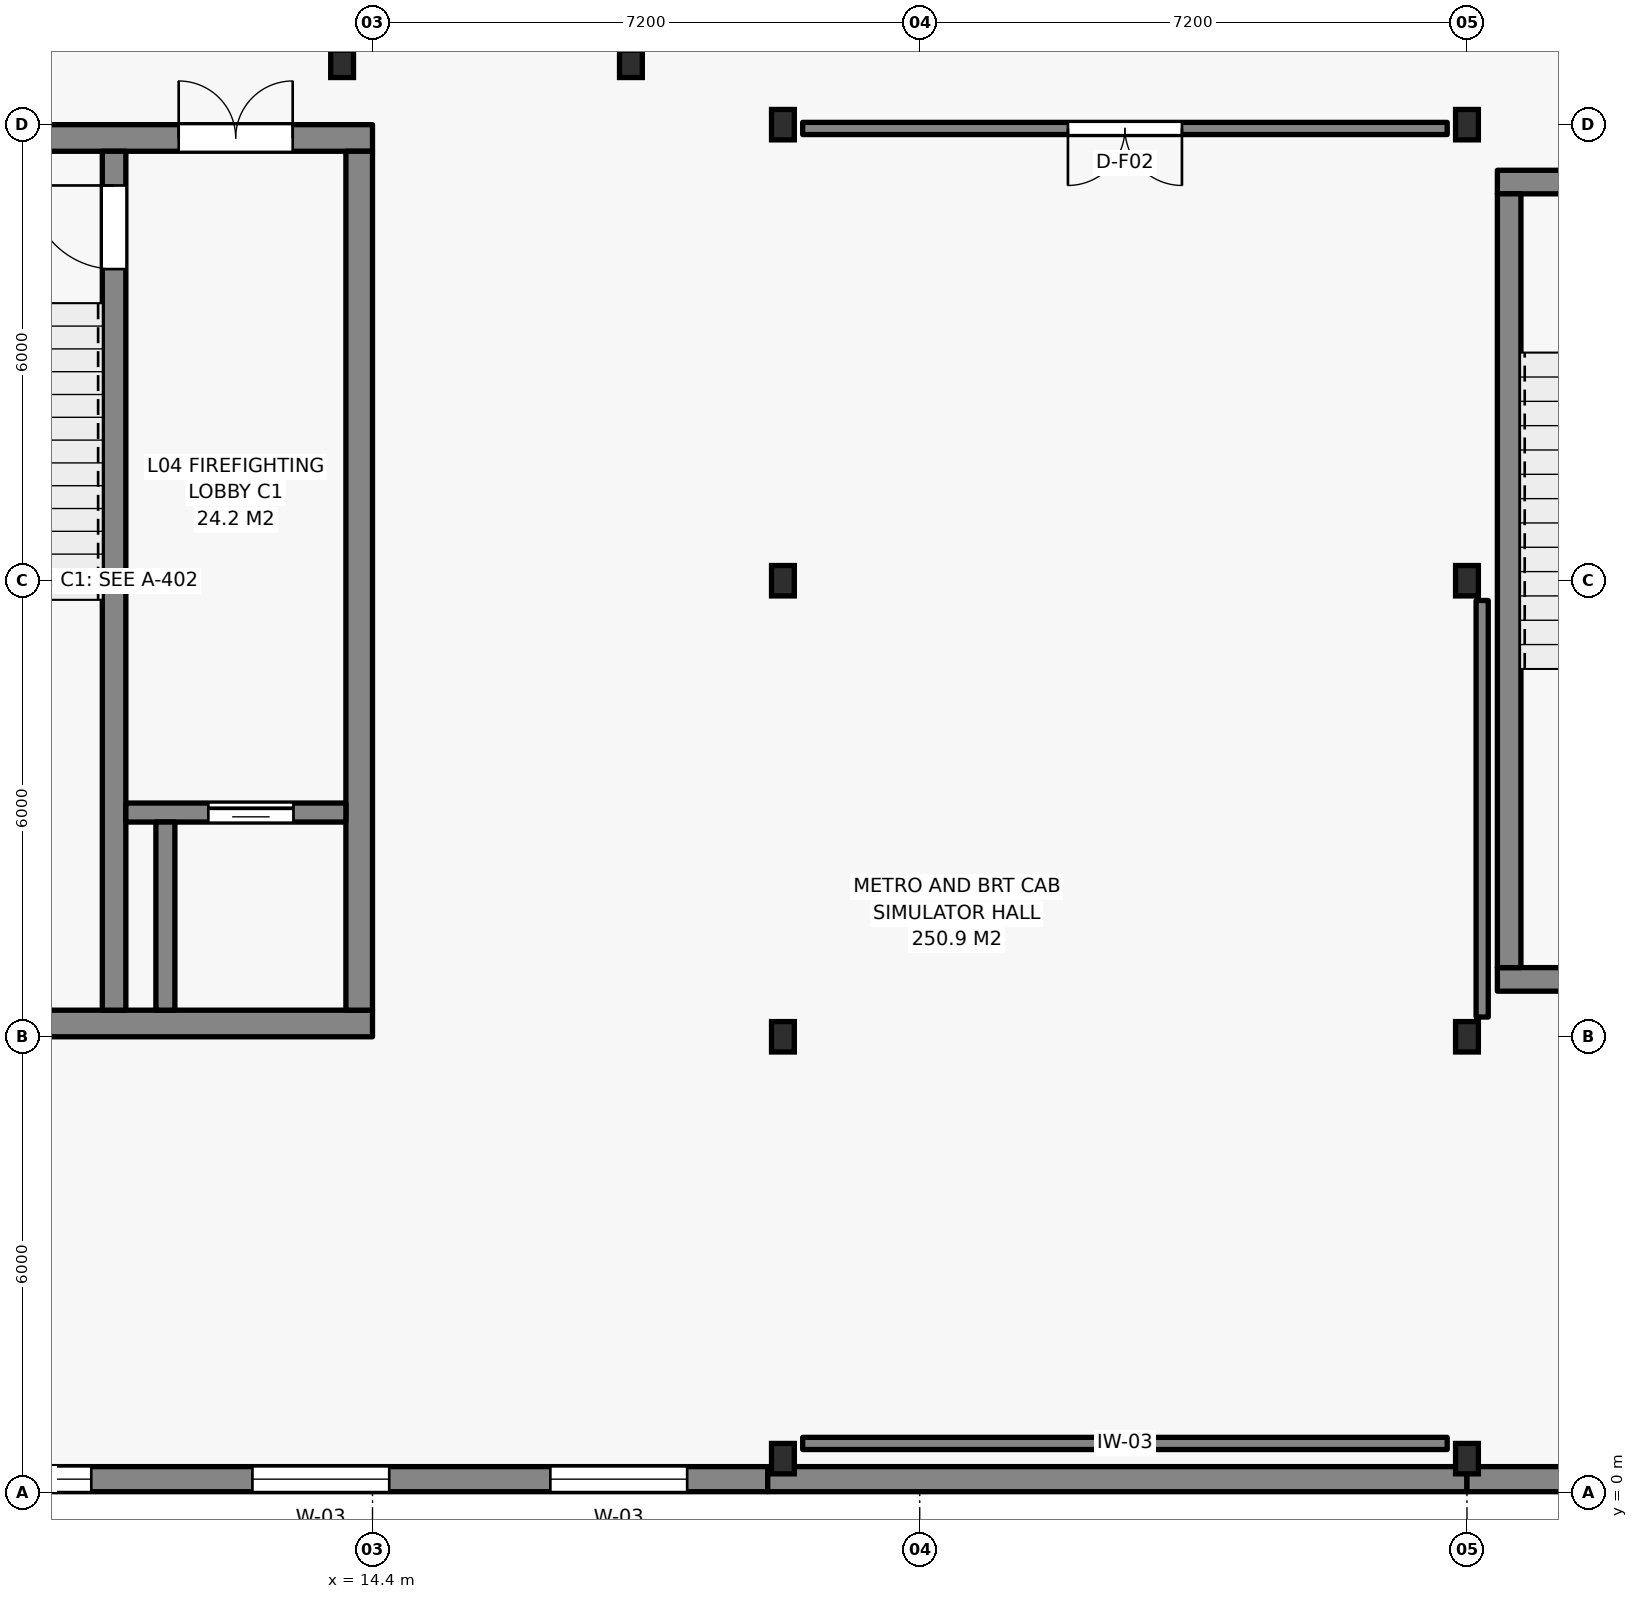
"""IFC4 building model, lengths in metres.
Left out: names, types, materials, properties, quantities, classifications, styles, units other than length and angle.
Written with IfcOpenShell. Run it as: python <this file> out.ifc"""

import sys

from ifc_helpers import new_model, si_unit, direction, frame, frame_2d, origin, origin_2d, place, context, subcontext, project, spatial, rectangle, i_section, extrude, element, fill, save


model = new_model("IFC4")
c1 = context("Model", 3, precision=1e-05, world=origin(), true_north=direction((0.0, 1.0)))
c2 = subcontext(c1, "Body", "Model", "MODEL_VIEW")
j1 = project(units=[si_unit("LENGTHUNIT", "METRE"), si_unit("PLANEANGLEUNIT", "RADIAN")], contexts=[c1])
p1 = place(None, origin())
s1 = spatial("IfcSite", under=j1, at=p1, CompositionType="ELEMENT")
p2 = place(p1, origin())
s2 = spatial("IfcBuilding", under=s1, at=p2, CompositionType="ELEMENT")
p3 = place(p2, frame((0.0, 0.0, 14.7)))
s3 = spatial("IfcBuildingStorey", under=s2, at=p3, CompositionType="ELEMENT", Elevation=14.7)
p4 = place(p3, frame((7.2, 6.175, 0.0), z_axis=(0.0, 0.0, 1.0), x_axis=(1.0, 0.0, 0.0)))
e1 = element("IfcWall", 1, at=p4, inside=s3, PredefinedType="SHEAR", context=c2, shape_type="SweptSolid", body=[
    extrude(rectangle(XDim=7.2, YDim=0.35, at=frame_2d((3.6, 0.0))), origin(), (0.0, 0.0, 1.0), 3.8),
])
p5 = place(p3, frame((7.2, 17.825, 0.0), z_axis=(0.0, 0.0, 1.0), x_axis=(1.0, 0.0, 0.0)))
e2 = element("IfcWall", 2, at=p5, inside=s3, PredefinedType="SHEAR", context=c2, shape_type="SweptSolid", body=[
    extrude(rectangle(XDim=7.2, YDim=0.35, at=frame_2d((3.6, 0.0))), origin(), (0.0, 0.0, 1.0), 3.8),
])
p6 = place(p5, frame((4.65, 0.0, 0.0)))
e3 = element("IfcOpeningElement", 3, at=p6, cuts=e2, PredefinedType="OPENING", context=c2, shape_type="SweptSolid", body=[
    extrude(rectangle(XDim=1.5, YDim=2.15, at=frame_2d((0.75, 1.075))), frame((0.0, 0.185, 0.0), z_axis=(0.0, -1.0, 0.0), x_axis=(1.0, 0.0, 0.0)), (0.0, 0.0, 1.0), 0.37),
])
p7 = place(p3, frame((14.225, 6.35, 0.0), z_axis=(0.0, 0.0, 1.0), x_axis=(0.0, 1.0, 0.0)))
e4 = element("IfcWall", 4, at=p7, inside=s3, PredefinedType="SHEAR", context=c2, shape_type="SweptSolid", body=[
    extrude(rectangle(XDim=11.3, YDim=0.35, at=frame_2d((5.65, 0.0))), origin(), (0.0, 0.0, 1.0), 3.8),
])
p8 = place(p3, frame((11.0, 6.35, 0.0), z_axis=(0.0, 0.0, 1.0), x_axis=(0.0, 1.0, 0.0)))
e5 = element("IfcWall", 5, at=p8, inside=s3, PredefinedType="SHEAR", context=c2, shape_type="SweptSolid", body=[
    extrude(rectangle(XDim=11.3, YDim=0.31, at=frame_2d((5.65, 0.0))), origin(), (0.0, 0.0, 1.0), 3.8),
])
p9 = place(p8, frame((9.75, 0.0, 0.0)))
e6 = element("IfcOpeningElement", 6, at=p9, cuts=e5, PredefinedType="OPENING", context=c2, shape_type="SweptSolid", body=[
    extrude(rectangle(XDim=1.1, YDim=2.15, at=frame_2d((0.55, 1.075))), frame((0.0, 0.165, 0.0), z_axis=(0.0, -1.0, 0.0), x_axis=(1.0, 0.0, 0.0)), (0.0, 0.0, 1.0), 0.33),
])
p10 = place(p3, frame((29.2, 6.755, 0.0), z_axis=(0.0, 0.0, 1.0), x_axis=(1.0, 0.0, 0.0)))
e7 = element("IfcWall", 7, at=p10, inside=s3, PredefinedType="SHEAR", context=c2, shape_type="SweptSolid", body=[
    extrude(rectangle(XDim=4.8, YDim=0.31, at=frame_2d((2.4, 0.0))), origin(), (0.0, 0.0, 1.0), 3.8),
])
p11 = place(p3, frame((29.2, 17.245, 0.0), z_axis=(0.0, 0.0, 1.0), x_axis=(1.0, 0.0, 0.0)))
e8 = element("IfcWall", 8, at=p11, inside=s3, PredefinedType="SHEAR", context=c2, shape_type="SweptSolid", body=[
    extrude(rectangle(XDim=4.8, YDim=0.31, at=frame_2d((2.4, 0.0))), origin(), (0.0, 0.0, 1.0), 3.8),
])
p12 = place(p11, frame((1.5, 0.0, 0.0)))
e9 = element("IfcOpeningElement", 9, at=p12, cuts=e8, PredefinedType="OPENING", context=c2, shape_type="SweptSolid", body=[
    extrude(rectangle(XDim=1.8, YDim=2.15, at=frame_2d((0.9, 1.075))), frame((0.0, 0.165, 0.0), z_axis=(0.0, -1.0, 0.0), x_axis=(1.0, 0.0, 0.0)), (0.0, 0.0, 1.0), 0.33),
])
p13 = place(p3, frame((29.355, 6.91, 0.0), z_axis=(0.0, 0.0, 1.0), x_axis=(0.0, 1.0, 0.0)))
e10 = element("IfcWall", 10, at=p13, inside=s3, PredefinedType="SHEAR", context=c2, shape_type="SweptSolid", body=[
    extrude(rectangle(XDim=10.18, YDim=0.31, at=frame_2d((5.09, 0.0))), origin(), (0.0, 0.0, 1.0), 3.8),
])
for number, where, z_axis, x_axis in (
    (11, (19.8, 0.45, 0.0), (0.0, 0.0, 1.0), (1.0, 0.0, 0.0)),
    (12, (19.8, 6.0, 0.0), (0.0, 0.0, 1.0), (1.0, 0.0, 0.0)),
    (13, (19.8, 12.0, 0.0), (0.0, 0.0, 1.0), (1.0, 0.0, 0.0)),
    (14, (19.8, 18.0, 0.0), (0.0, 0.0, 1.0), (1.0, 0.0, 0.0)),
    (15, (28.8, 0.45, 0.0), (0.0, 0.0, 1.0), (1.0, 0.0, 0.0)),
    (16, (28.8, 6.0, 0.0), (0.0, 0.0, 1.0), (1.0, 0.0, 0.0)),
    (17, (28.8, 12.0, 0.0), (0.0, 0.0, 1.0), (1.0, 0.0, 0.0)),
    (18, (28.8, 18.0, 0.0), (0.0, 0.0, 1.0), (1.0, 0.0, 0.0)),
):
    element("IfcColumn", number, at=place(p3, frame(where, z_axis=z_axis, x_axis=x_axis)), inside=s3, PredefinedType="COLUMN", context=c2, shape_type="SweptSolid", body=[
        extrude(i_section(OverallWidth=0.3, OverallDepth=0.4, WebThickness=0.013, FlangeThickness=0.024, FilletRadius=0.027, at=origin_2d()), origin(), (0.0, 0.0, 1.0), 4.05),
    ])
for number, where, z_axis, x_axis in (
    (19, (14.0, 18.8, 0.0), (0.0, 0.0, 1.0), (1.0, 0.0, 0.0)),
    (20, (17.8, 18.8, 0.0), (0.0, 0.0, 1.0), (1.0, 0.0, 0.0)),
):
    element("IfcColumn", number, at=place(p3, frame(where, z_axis=z_axis, x_axis=x_axis)), inside=s3, PredefinedType="COLUMN", context=c2, shape_type="SweptSolid", body=[
        extrude(i_section(OverallWidth=0.3, OverallDepth=0.36, WebThickness=0.012, FlangeThickness=0.022, FilletRadius=0.027, at=origin_2d()), origin(), (0.0, 0.0, 1.0), 4.05),
    ])
p14 = place(p3, frame((0.0, 0.18, 0.0), z_axis=(0.0, 0.0, 1.0), x_axis=(1.0, 0.0, 0.0)))
e21 = element("IfcWall", 21, at=p14, inside=s3, PredefinedType="SOLIDWALL", context=c2, shape_type="SweptSolid", body=[
    extrude(rectangle(XDim=19.6, YDim=0.33, at=frame_2d((9.8, 0.0))), origin(), (0.0, 0.0, 1.0), 3.575),
])
p15 = place(p14, frame((1.06, 0.0, 0.82)))
e22 = element("IfcOpeningElement", 22, at=p15, cuts=e21, PredefinedType="OPENING", context=c2, shape_type="SweptSolid", body=[
    extrude(rectangle(XDim=1.8, YDim=2.35, at=frame_2d((0.9, 1.175))), frame((0.0, 0.175, 0.0), z_axis=(0.0, -1.0, 0.0), x_axis=(1.0, 0.0, 0.0)), (0.0, 0.0, 1.0), 0.35),
])
p16 = place(p14, frame((8.9, 0.0, 0.82)))
e23 = element("IfcOpeningElement", 23, at=p16, cuts=e21, PredefinedType="OPENING", context=c2, shape_type="SweptSolid", body=[
    extrude(rectangle(XDim=1.8, YDim=2.35, at=frame_2d((0.9, 1.175))), frame((0.0, 0.175, 0.0), z_axis=(0.0, -1.0, 0.0), x_axis=(1.0, 0.0, 0.0)), (0.0, 0.0, 1.0), 0.35),
])
p17 = place(p14, frame((12.82, 0.0, 0.82)))
e24 = element("IfcOpeningElement", 24, at=p17, cuts=e21, PredefinedType="OPENING", context=c2, shape_type="SweptSolid", body=[
    extrude(rectangle(XDim=1.8, YDim=2.35, at=frame_2d((0.9, 1.175))), frame((0.0, 0.175, 0.0), z_axis=(0.0, -1.0, 0.0), x_axis=(1.0, 0.0, 0.0)), (0.0, 0.0, 1.0), 0.35),
])
p18 = place(p14, frame((16.74, 0.0, 0.82)))
e25 = element("IfcOpeningElement", 25, at=p18, cuts=e21, PredefinedType="OPENING", context=c2, shape_type="SweptSolid", body=[
    extrude(rectangle(XDim=1.8, YDim=2.35, at=frame_2d((0.9, 1.175))), frame((0.0, 0.175, 0.0), z_axis=(0.0, -1.0, 0.0), x_axis=(1.0, 0.0, 0.0)), (0.0, 0.0, 1.0), 0.35),
])
p19 = place(p3, frame((19.6, 0.18, 0.0), z_axis=(0.0, 0.0, 1.0), x_axis=(1.0, 0.0, 0.0)))
e26 = element("IfcWall", 26, at=p19, inside=s3, PredefinedType="SOLIDWALL", context=c2, shape_type="SweptSolid", body=[
    extrude(rectangle(XDim=9.2, YDim=0.33, at=frame_2d((4.6, 0.0))), origin(), (0.0, 0.0, 1.0), 3.295),
])
p20 = place(p3, frame((28.8, 0.18, 0.0), z_axis=(0.0, 0.0, 1.0), x_axis=(1.0, 0.0, 0.0)))
e27 = element("IfcWall", 27, at=p20, inside=s3, PredefinedType="SOLIDWALL", context=c2, shape_type="SweptSolid", body=[
    extrude(rectangle(XDim=7.2, YDim=0.33, at=frame_2d((3.6, 0.0))), origin(), (0.0, 0.0, 1.0), 3.78),
])
p21 = place(p20, frame((2.7, 0.0, 0.82)))
e28 = element("IfcOpeningElement", 28, at=p21, cuts=e27, PredefinedType="OPENING", context=c2, shape_type="SweptSolid", body=[
    extrude(rectangle(XDim=1.8, YDim=2.35, at=frame_2d((0.9, 1.175))), frame((0.0, 0.175, 0.0), z_axis=(0.0, -1.0, 0.0), x_axis=(1.0, 0.0, 0.0)), (0.0, 0.0, 1.0), 0.35),
])
p22 = place(p3, frame((11.155, 8.95, 0.0), z_axis=(0.0, 0.0, 1.0), x_axis=(1.0, 0.0, 0.0)))
e29 = element("IfcWall", 29, at=p22, inside=s3, PredefinedType="SHEAR", context=c2, shape_type="SweptSolid", body=[
    extrude(rectangle(XDim=2.895, YDim=0.25, at=frame_2d((1.448, 0.0))), origin(), (0.0, 0.0, 1.0), 3.8),
])
p23 = place(p22, frame((1.085, 0.0, 0.0)))
e30 = element("IfcOpeningElement", 30, at=p23, cuts=e29, PredefinedType="OPENING", context=c2, shape_type="SweptSolid", body=[
    extrude(rectangle(XDim=1.12, YDim=2.15, at=frame_2d((0.56, 1.075))), frame((0.0, 0.135, 0.0), z_axis=(0.0, -1.0, 0.0), x_axis=(1.0, 0.0, 0.0)), (0.0, 0.0, 1.0), 0.27),
])
p24 = place(p3, frame((11.675, 6.35, 0.0), z_axis=(0.0, 0.0, 1.0), x_axis=(0.0, 1.0, 0.0)))
e31 = element("IfcWall", 31, at=p24, inside=s3, PredefinedType="SHEAR", context=c2, shape_type="SweptSolid", body=[
    extrude(rectangle(XDim=2.475, YDim=0.25, at=frame_2d((1.237, 0.0))), origin(), (0.0, 0.0, 1.0), 3.8),
])
p25 = place(p3, frame((20.06, 0.65, 0.0), z_axis=(0.0, 0.0, 1.0), x_axis=(1.0, 0.0, 0.0)))
e32 = element("IfcWall", 32, at=p25, inside=s3, PredefinedType="PARTITIONING", context=c2, shape_type="SweptSolid", body=[
    extrude(rectangle(XDim=8.48, YDim=0.16, at=frame_2d((4.24, 0.0))), origin(), (0.0, 0.0, 1.0), 3.295),
])
p26 = place(p3, frame((29.0, 6.26, 0.0), z_axis=(0.0, 0.0, 1.0), x_axis=(0.0, 1.0, 0.0)))
e33 = element("IfcWall", 33, at=p26, inside=s3, PredefinedType="PARTITIONING", context=c2, shape_type="SweptSolid", body=[
    extrude(rectangle(XDim=5.48, YDim=0.16, at=frame_2d((2.74, 0.0))), origin(), (0.0, 0.0, 1.0), 3.435),
])
p27 = place(p3, frame((28.54, 17.95, 0.0), z_axis=(0.0, 0.0, 1.0), x_axis=(-1.0, 0.0, 0.0)))
e34 = element("IfcWall", 34, at=p27, inside=s3, PredefinedType="PARTITIONING", context=c2, shape_type="SweptSolid", body=[
    extrude(rectangle(XDim=8.48, YDim=0.16, at=frame_2d((4.24, 0.0))), origin(), (0.0, 0.0, 1.0), 3.295),
])
p28 = place(p27, frame((3.49, 0.0, 0.0)))
e35 = element("IfcOpeningElement", 35, at=p28, cuts=e34, PredefinedType="OPENING", context=c2, shape_type="SweptSolid", body=[
    extrude(rectangle(XDim=1.5, YDim=2.15, at=frame_2d((0.75, 1.075))), frame((0.0, 0.09, 0.0), z_axis=(0.0, -1.0, 0.0), x_axis=(1.0, 0.0, 0.0)), (0.0, 0.0, 1.0), 0.18),
])
p29 = place(p16, origin())
e36 = element("IfcWindow", 36, at=p29, inside=s3, PartitioningType="SINGLE_PANEL", PredefinedType="WINDOW", context=c2, shape_type="SweptSolid", body=[
    extrude(rectangle(XDim=1.8, YDim=2.35, at=frame_2d((0.9, 1.175))), frame((0.0, 0.03, 0.0), z_axis=(0.0, -1.0, 0.0), x_axis=(1.0, 0.0, 0.0)), (0.0, 0.0, 1.0), 0.06),
])
fill(e23, e36)
p30 = place(p17, origin())
e37 = element("IfcWindow", 37, at=p30, inside=s3, PartitioningType="SINGLE_PANEL", PredefinedType="WINDOW", context=c2, shape_type="SweptSolid", body=[
    extrude(rectangle(XDim=1.8, YDim=2.35, at=frame_2d((0.9, 1.175))), frame((0.0, 0.03, 0.0), z_axis=(0.0, -1.0, 0.0), x_axis=(1.0, 0.0, 0.0)), (0.0, 0.0, 1.0), 0.06),
])
fill(e24, e37)
p31 = place(p18, origin())
e38 = element("IfcWindow", 38, at=p31, inside=s3, PartitioningType="SINGLE_PANEL", PredefinedType="WINDOW", context=c2, shape_type="SweptSolid", body=[
    extrude(rectangle(XDim=1.8, YDim=2.35, at=frame_2d((0.9, 1.175))), frame((0.0, 0.03, 0.0), z_axis=(0.0, -1.0, 0.0), x_axis=(1.0, 0.0, 0.0)), (0.0, 0.0, 1.0), 0.06),
])
fill(e25, e38)
p32 = place(p23, origin())
e39 = element("IfcDoor", 39, at=p32, inside=s3, OperationType="SLIDING_TO_LEFT", PredefinedType="DOOR", context=c2, shape_type="SweptSolid", body=[
    extrude(rectangle(XDim=1.12, YDim=2.15, at=frame_2d((0.56, 1.075))), frame((0.0, 0.025, 0.0), z_axis=(0.0, -1.0, 0.0), x_axis=(1.0, 0.0, 0.0)), (0.0, 0.0, 1.0), 0.05),
])
fill(e30, e39)
p33 = place(p6, origin())
e40 = element("IfcDoor", 40, at=p33, inside=s3, OperationType="DOUBLE_DOOR_SINGLE_SWING", PredefinedType="DOOR", context=c2, shape_type="SweptSolid", body=[
    extrude(rectangle(XDim=1.5, YDim=2.15, at=frame_2d((0.75, 1.075))), frame((0.0, 0.025, 0.0), z_axis=(0.0, -1.0, 0.0), x_axis=(1.0, 0.0, 0.0)), (0.0, 0.0, 1.0), 0.05),
])
fill(e3, e40)
p34 = place(p9, origin())
e41 = element("IfcDoor", 41, at=p34, inside=s3, OperationType="SINGLE_SWING_RIGHT", PredefinedType="DOOR", context=c2, shape_type="SweptSolid", body=[
    extrude(rectangle(XDim=1.1, YDim=2.15, at=frame_2d((0.55, 1.075))), frame((0.0, 0.025, 0.0), z_axis=(0.0, -1.0, 0.0), x_axis=(1.0, 0.0, 0.0)), (0.0, 0.0, 1.0), 0.05),
])
fill(e6, e41)
p35 = place(p28, origin())
e42 = element("IfcDoor", 42, at=p35, inside=s3, OperationType="DOUBLE_DOOR_SINGLE_SWING", PredefinedType="DOOR", context=c2, shape_type="SweptSolid", body=[
    extrude(rectangle(XDim=1.5, YDim=2.15, at=frame_2d((0.75, 1.075))), frame((0.0, 0.025, 0.0), z_axis=(0.0, -1.0, 0.0), x_axis=(1.0, 0.0, 0.0)), (0.0, 0.0, 1.0), 0.05),
])
fill(e35, e42)
save(model, sys.argv[1])
